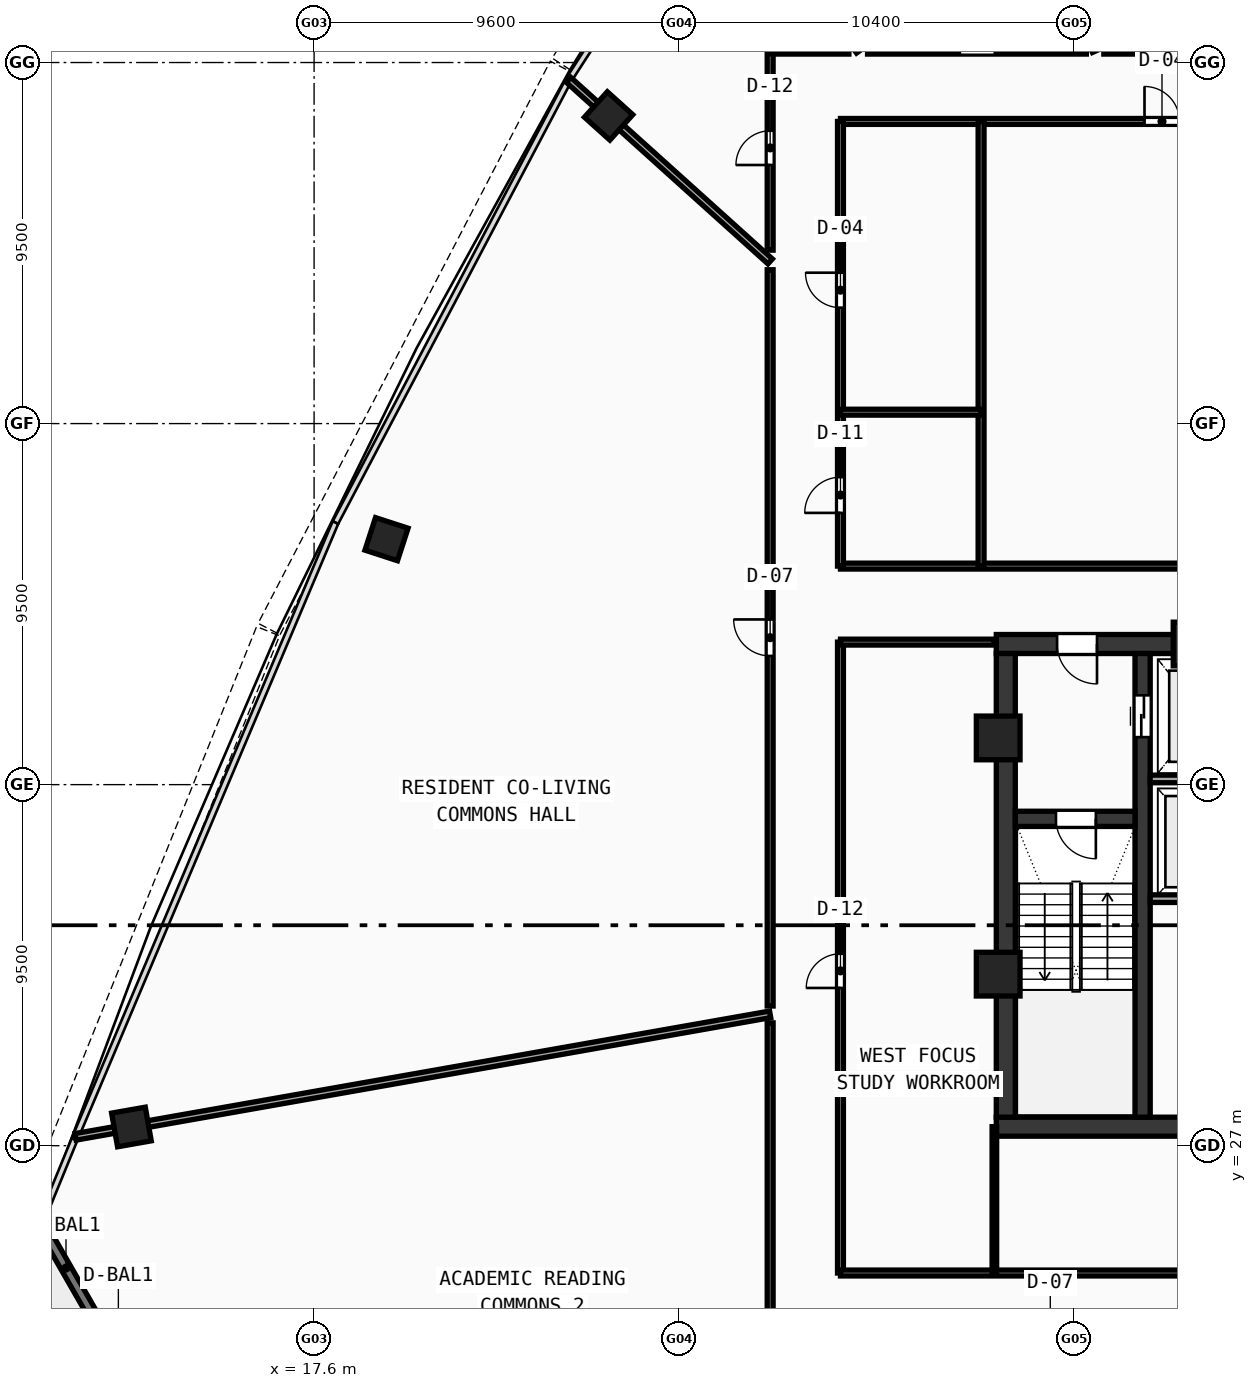
"""IFC4 building model, lengths in metres.
Left out: names, types, materials, properties, quantities, classifications, styles, units other than length and angle.
Written with IfcOpenShell. Run it as: python <this file> out.ifc"""

import sys

from ifc_helpers import new_model, si_unit, direction, frame, frame_2d, origin, origin_with_axes, origin_2d, place, context, subcontext, project, spatial, rectangle, hollow_rectangle, extrude, source, transform, mapped, element, fill, save


model = new_model("IFC4")
c1 = context("Model", 3, precision=1e-05, world=origin(), true_north=direction((0.0, 1.0)))
c2 = subcontext(c1, "Body", "Model", "MODEL_VIEW")
j1 = project(units=[si_unit("LENGTHUNIT", "METRE"), si_unit("PLANEANGLEUNIT", "RADIAN")], contexts=[c1])
p1 = place(None, origin())
s1 = spatial("IfcSite", under=j1, at=p1, CompositionType="ELEMENT")
p2 = place(p1, origin())
s2 = spatial("IfcBuilding", under=s1, at=p2, CompositionType="ELEMENT")
p3 = place(p2, frame((0.0, 0.0, 215.16)))
s3 = spatial("IfcBuildingStorey", under=s2, at=p3, CompositionType="ELEMENT", Elevation=215.16)
p4 = place(p3, frame((35.55, 27.5, 0.0), z_axis=(0.0, 0.0, 1.0), x_axis=(1.0, 0.0, 0.0)))
e1 = element("IfcWall", 1, at=p4, inside=s3, PredefinedType="SHEAR", context=c2, shape_type="SweptSolid", body=[
    extrude(rectangle(XDim=24.9, YDim=0.5, at=frame_2d((12.45, 0.0))), origin(), (0.0, 0.0, 1.0), 3.52),
])
p5 = place(p3, frame((35.55, 40.2, 0.0), z_axis=(0.0, 0.0, 1.0), x_axis=(1.0, 0.0, 0.0)))
e2 = element("IfcWall", 2, at=p5, inside=s3, PredefinedType="SHEAR", context=c2, shape_type="SweptSolid", body=[
    extrude(rectangle(XDim=11.25, YDim=0.5, at=frame_2d((5.625, 0.0))), origin(), (0.0, 0.0, 1.0), 3.52),
])
p6 = place(p5, frame((1.6, 0.0, 0.0)))
e3 = element("IfcOpeningElement", 3, at=p6, cuts=e2, PredefinedType="OPENING", context=c2, shape_type="SweptSolid", body=[
    extrude(rectangle(XDim=1.05, YDim=2.1, at=frame_2d((0.525, 1.05))), frame((0.0, 0.26, 0.0), z_axis=(0.0, -1.0, 0.0), x_axis=(1.0, 0.0, 0.0)), (0.0, 0.0, 1.0), 0.52),
])
p7 = place(p3, frame((35.8, 27.75, 0.0), z_axis=(0.0, 0.0, 1.0), x_axis=(0.0, 1.0, 0.0)))
e4 = element("IfcWall", 4, at=p7, inside=s3, PredefinedType="SHEAR", context=c2, shape_type="SweptSolid", body=[
    extrude(rectangle(XDim=12.2, YDim=0.5, at=frame_2d((6.1, 0.0))), origin(), (0.0, 0.0, 1.0), 3.52),
])
p8 = place(p3, frame((39.4, 27.75, 0.0), z_axis=(0.0, 0.0, 1.0), x_axis=(0.0, 1.0, 0.0)))
e5 = element("IfcWall", 5, at=p8, inside=s3, PredefinedType="SHEAR", context=c2, shape_type="SweptSolid", body=[
    extrude(rectangle(XDim=12.2, YDim=0.4, at=frame_2d((6.1, 0.0))), origin(), (0.0, 0.0, 1.0), 3.52),
])
p9 = place(p8, frame((10.0, 0.0, 0.0)))
e6 = element("IfcOpeningElement", 6, at=p9, cuts=e5, PredefinedType="OPENING", context=c2, shape_type="SweptSolid", body=[
    extrude(rectangle(XDim=1.1, YDim=2.1, at=frame_2d((0.55, 1.05))), frame((0.0, 0.21, 0.0), z_axis=(0.0, -1.0, 0.0), x_axis=(1.0, 0.0, 0.0)), (0.0, 0.0, 1.0), 0.42),
])
p10 = place(p3, frame((36.05, 35.6, 0.0), z_axis=(0.0, 0.0, 1.0), x_axis=(1.0, 0.0, 0.0)))
e7 = element("IfcWall", 7, at=p10, inside=s3, PredefinedType="SHEAR", context=c2, shape_type="SweptSolid", body=[
    extrude(rectangle(XDim=3.15, YDim=0.4, at=frame_2d((1.575, 0.0))), origin(), (0.0, 0.0, 1.0), 3.52),
])
p11 = place(p10, frame((1.07, 0.0, 0.0)))
e8 = element("IfcOpeningElement", 8, at=p11, cuts=e7, PredefinedType="OPENING", context=c2, shape_type="SweptSolid", body=[
    extrude(rectangle(XDim=1.05, YDim=2.1, at=frame_2d((0.525, 1.05))), frame((0.0, 0.21, 0.0), z_axis=(0.0, -1.0, 0.0), x_axis=(1.0, 0.0, 0.0)), (0.0, 0.0, 1.0), 0.42),
])
m1 = source(origin(), c2, "Body", "SweptSolid", [
    extrude(hollow_rectangle(XDim=1.15, YDim=1.15, WallThickness=0.048, at=origin_2d()), origin(), (0.0, 0.0, 1.0), 3.78),
])
for number, where, z_axis, x_axis in (
    (9, (40.781, 40.2, -0.26), (0.0, 0.0, 1.0), (1.0, 0.0, 0.0)),
    (10, (35.6, 37.729, -0.26), (0.0, 0.0, 1.0), (1.0, 0.0, 0.0)),
    (11, (35.6, 31.513, -0.26), (0.0, 0.0, 1.0), (1.0, 0.0, 0.0)),
):
    element("IfcColumn", number, at=place(p3, frame(where, z_axis=z_axis, x_axis=x_axis)), inside=s3, PredefinedType="COLUMN", context=c2, shape_type="MappedRepresentation", body=[
        mapped(m1, transform((0.0, 0.0, 0.0), scale=1.0)),
    ])
m2 = source(origin(), c2, "Body", "SweptSolid", [
    extrude(hollow_rectangle(XDim=0.9, YDim=0.9, WallThickness=0.036, at=origin_2d()), origin(), (0.0, 0.0, 1.0), 3.78),
])
for number, where, z_axis, x_axis in (
    (12, (25.349, 54.095, -0.26), (0.0, 0.0, 1.0), (-0.669, -0.743, 0.0)),
    (13, (19.505, 42.958, -0.26), (0.0, 0.0, 1.0), (-0.309, -0.951, 0.0)),
    (14, (12.793, 27.492, -0.26), (0.0, 0.0, 1.0), (0.174, -0.985, 0.0)),
):
    element("IfcColumn", number, at=place(p3, frame(where, z_axis=z_axis, x_axis=x_axis)), inside=s3, PredefinedType="COLUMN", context=c2, shape_type="MappedRepresentation", body=[
        mapped(m2, transform((0.0, 0.0, 0.0), scale=1.0)),
    ])
p12 = place(p3, frame((10.365, 25.01, 0.0), z_axis=(0.0, 0.0, 1.0), x_axis=(0.497934125263, -0.867214856249, 0.0)))
e15 = element("IfcWall", 15, at=p12, inside=s3, PredefinedType="STANDARD", context=c2, shape_type="SweptSolid", body=[
    extrude(rectangle(XDim=8.373, YDim=0.26, at=frame_2d((4.186, 0.0))), origin(), (0.0, 0.0, 1.0), 3.52),
])
p13 = place(p12, frame((3.286, 0.0, 0.0)))
e16 = element("IfcOpeningElement", 16, at=p13, cuts=e15, PredefinedType="OPENING", context=c2, shape_type="SweptSolid", body=[
    extrude(rectangle(XDim=1.8, YDim=2.15, at=frame_2d((0.9, 1.075))), frame((0.0, 0.14, 0.0), z_axis=(0.0, -1.0, 0.0), x_axis=(1.0, 0.0, 0.0)), (0.0, 0.0, 1.0), 0.28),
])
for number, where, z_axis, x_axis in (
    (17, (39.6, 36.65, 0.0), (0.0, 0.0, 1.0), (1.0, 0.0, 0.0)),
    (18, (39.6, 33.5, 0.0), (0.0, 0.0, 1.0), (1.0, 0.0, 0.0)),
):
    element("IfcWall", number, at=place(p3, frame(where, z_axis=z_axis, x_axis=x_axis)), inside=s3, PredefinedType="SOLIDWALL", context=c2, shape_type="SweptSolid", body=[
        extrude(rectangle(XDim=2.72, YDim=0.2, at=frame_2d((1.36, 0.0))), origin(), (0.0, 0.0, 1.0), 3.52),
    ])
p14 = place(p3, frame((31.45, 42.25, 0.0), z_axis=(0.0, 0.0, 1.0), x_axis=(1.0, 0.0, 0.0)))
e19 = element("IfcWall", 19, at=p14, inside=s3, PredefinedType="PARTITIONING", context=c2, shape_type="SweptSolid", body=[
    extrude(rectangle(XDim=33.1, YDim=0.155, at=frame_2d((16.55, 0.0))), origin(), (0.0, 0.0, 1.0), 2.87),
])
p15 = place(p3, frame((31.45, 53.95, 0.0), z_axis=(0.0, 0.0, 1.0), x_axis=(1.0, 0.0, 0.0)))
e20 = element("IfcWall", 20, at=p15, inside=s3, PredefinedType="PARTITIONING", context=c2, shape_type="SweptSolid", body=[
    extrude(rectangle(XDim=33.1, YDim=0.155, at=frame_2d((16.55, 0.0))), origin(), (0.0, 0.0, 1.0), 2.87),
])
p16 = place(p15, frame((8.0, 0.0, 0.0)))
e21 = element("IfcOpeningElement", 21, at=p16, cuts=e20, PredefinedType="OPENING", context=c2, shape_type="SweptSolid", body=[
    extrude(rectangle(XDim=0.92, YDim=2.1, at=frame_2d((0.46, 1.05))), frame((0.0, 0.087, 0.0), z_axis=(0.0, -1.0, 0.0), x_axis=(1.0, 0.0, 0.0)), (0.0, 0.0, 1.0), 0.175),
])
p17 = place(p15, frame((27.05, 0.0, 0.0)))
e22 = element("IfcOpeningElement", 22, at=p17, cuts=e20, PredefinedType="OPENING", context=c2, shape_type="SweptSolid", body=[
    extrude(rectangle(XDim=0.92, YDim=2.1, at=frame_2d((0.46, 1.05))), frame((0.0, 0.087, 0.0), z_axis=(0.0, -1.0, 0.0), x_axis=(1.0, 0.0, 0.0)), (0.0, 0.0, 1.0), 0.175),
])
p18 = place(p3, frame((31.45, 42.25, 0.0), z_axis=(0.0, 0.0, 1.0), x_axis=(0.0, 1.0, 0.0)))
e23 = element("IfcWall", 23, at=p18, inside=s3, PredefinedType="PARTITIONING", context=c2, shape_type="SweptSolid", body=[
    extrude(rectangle(XDim=11.7, YDim=0.155, at=frame_2d((5.85, 0.0))), origin(), (0.0, 0.0, 1.0), 2.87),
])
p19 = place(p18, frame((1.4, 0.0, 0.0)))
e24 = element("IfcOpeningElement", 24, at=p19, cuts=e23, PredefinedType="OPENING", context=c2, shape_type="SweptSolid", body=[
    extrude(rectangle(XDim=0.94, YDim=2.1, at=frame_2d((0.47, 1.05))), frame((0.0, 0.087, 0.0), z_axis=(0.0, -1.0, 0.0), x_axis=(1.0, 0.0, 0.0)), (0.0, 0.0, 1.0), 0.175),
])
p20 = place(p18, frame((6.8, 0.0, 0.0)))
e25 = element("IfcOpeningElement", 25, at=p20, cuts=e23, PredefinedType="OPENING", context=c2, shape_type="SweptSolid", body=[
    extrude(rectangle(XDim=0.92, YDim=2.1, at=frame_2d((0.46, 1.05))), frame((0.0, 0.087, 0.0), z_axis=(0.0, -1.0, 0.0), x_axis=(1.0, 0.0, 0.0)), (0.0, 0.0, 1.0), 0.175),
])
p21 = place(p3, frame((35.15, 42.25, 0.0), z_axis=(0.0, 0.0, 1.0), x_axis=(0.0, 1.0, 0.0)))
e26 = element("IfcWall", 26, at=p21, inside=s3, PredefinedType="PARTITIONING", context=c2, shape_type="SweptSolid", body=[
    extrude(rectangle(XDim=11.7, YDim=0.155, at=frame_2d((5.85, 0.0))), origin(), (0.0, 0.0, 1.0), 2.87),
])
p22 = place(p3, frame((31.45, 46.3, 0.0), z_axis=(0.0, 0.0, 1.0), x_axis=(1.0, 0.0, 0.0)))
e27 = element("IfcWall", 27, at=p22, inside=s3, PredefinedType="PARTITIONING", context=c2, shape_type="SweptSolid", body=[
    extrude(rectangle(XDim=3.7, YDim=0.155, at=frame_2d((1.85, 0.0))), origin(), (0.0, 0.0, 1.0), 2.87),
])
p23 = place(p3, frame((31.45, 23.65, 0.0), z_axis=(0.0, 0.0, 1.0), x_axis=(0.0, 1.0, 0.0)))
e28 = element("IfcWall", 28, at=p23, inside=s3, PredefinedType="PARTITIONING", context=c2, shape_type="SweptSolid", body=[
    extrude(rectangle(XDim=16.6, YDim=0.155, at=frame_2d((8.3, 0.0))), origin(), (0.0, 0.0, 1.0), 2.87),
])
p24 = place(p23, frame((7.5, 0.0, 0.0)))
e29 = element("IfcOpeningElement", 29, at=p24, cuts=e28, PredefinedType="OPENING", context=c2, shape_type="SweptSolid", body=[
    extrude(rectangle(XDim=0.9, YDim=2.08, at=frame_2d((0.45, 1.04))), frame((0.0, 0.087, 0.0), z_axis=(0.0, -1.0, 0.0), x_axis=(1.0, 0.0, 0.0)), (0.0, 0.0, 1.0), 0.175),
])
p25 = place(p3, frame((31.45, 23.65, 0.0), z_axis=(0.0, 0.0, 1.0), x_axis=(1.0, 0.0, 0.0)))
e30 = element("IfcWall", 30, at=p25, inside=s3, PredefinedType="PARTITIONING", context=c2, shape_type="SweptSolid", body=[
    extrude(rectangle(XDim=33.1, YDim=0.155, at=frame_2d((16.55, 0.0))), origin(), (0.0, 0.0, 1.0), 2.87),
])
p26 = place(p25, frame((16.0, 0.0, 0.0)))
e31 = element("IfcOpeningElement", 31, at=p26, cuts=e30, PredefinedType="OPENING", context=c2, shape_type="SweptSolid", body=[
    extrude(rectangle(XDim=0.92, YDim=2.1, at=frame_2d((0.46, 1.05))), frame((0.0, 0.087, 0.0), z_axis=(0.0, -1.0, 0.0), x_axis=(1.0, 0.0, 0.0)), (0.0, 0.0, 1.0), 0.175),
])
p27 = place(p3, frame((31.45, 40.25, 0.0), z_axis=(0.0, 0.0, 1.0), x_axis=(1.0, 0.0, 0.0)))
e32 = element("IfcWall", 32, at=p27, inside=s3, PredefinedType="PARTITIONING", context=c2, shape_type="SweptSolid", body=[
    extrude(rectangle(XDim=4.05, YDim=0.155, at=frame_2d((2.025, 0.0))), origin(), (0.0, 0.0, 1.0), 3.52),
])
p28 = place(p3, frame((35.5, 23.65, 0.0), z_axis=(0.0, 0.0, 1.0), x_axis=(0.0, 1.0, 0.0)))
e33 = element("IfcWall", 33, at=p28, inside=s3, PredefinedType="PARTITIONING", context=c2, shape_type="SweptSolid", body=[
    extrude(rectangle(XDim=3.85, YDim=0.12, at=frame_2d((1.925, 0.0))), origin(), (0.0, 0.0, 1.0), 3.12),
])
p29 = place(p3, frame((38.16, 55.8, 0.0), z_axis=(0.0, 0.0, 1.0), x_axis=(-0.406732574237, 0.913547269196, 0.0)))
e34 = element("IfcWall", 34, at=p29, inside=s3, PredefinedType="PARTITIONING", context=c2, shape_type="SweptSolid", body=[
    extrude(rectangle(XDim=13.419, YDim=0.175, at=frame_2d((6.709, 0.0))), origin(), (0.0, 0.0, 1.0), 2.87),
])
p30 = place(p3, frame((31.943, 55.8, 0.0), z_axis=(0.0, 0.0, 1.0), x_axis=(-0.587786531485, 0.809016064986, 0.0)))
e35 = element("IfcWall", 35, at=p30, inside=s3, PredefinedType="PARTITIONING", context=c2, shape_type="SweptSolid", body=[
    extrude(rectangle(XDim=6.446, YDim=0.175, at=frame_2d((3.223, 0.0))), origin(), (0.0, 0.0, 1.0), 2.87),
])
p31 = place(p3, frame((29.6, 50.267, 0.0), z_axis=(0.0, 0.0, 1.0), x_axis=(-0.743146095384, 0.669129195982, 0.0)))
e36 = element("IfcWall", 36, at=p31, inside=s3, PredefinedType="PARTITIONING", context=c2, shape_type="SweptSolid", body=[
    extrude(rectangle(XDim=7.135, YDim=0.175, at=frame_2d((3.567, 0.0))), origin(), (0.0, 0.0, 1.0), 2.87),
])
p32 = place(p3, frame((29.6, 30.456, 0.0), z_axis=(0.0, 0.0, 1.0), x_axis=(-0.984808051039, -0.173646487465, 0.0)))
e37 = element("IfcWall", 37, at=p32, inside=s3, PredefinedType="PARTITIONING", context=c2, shape_type="SweptSolid", body=[
    extrude(rectangle(XDim=18.557, YDim=0.175, at=frame_2d((9.279, 0.0))), origin(), (0.0, 0.0, 1.0), 2.87),
])
p33 = place(p3, frame((29.6, 21.8, 0.0), z_axis=(0.0, 0.0, 1.0), x_axis=(0.0, 1.0, 0.0)))
e38 = element("IfcWall", 38, at=p33, inside=s3, PredefinedType="PARTITIONING", context=c2, shape_type="SweptSolid", body=[
    extrude(rectangle(XDim=8.432, YDim=0.155, at=frame_2d((4.216, 0.0))), origin(), (0.0, 0.0, 1.0), 3.12),
])
p34 = place(p3, frame((29.6, 30.675, 0.0), z_axis=(0.0, 0.0, 1.0), x_axis=(0.0, 1.0, 0.0)))
e39 = element("IfcWall", 39, at=p34, inside=s3, PredefinedType="PARTITIONING", context=c2, shape_type="SweptSolid", body=[
    extrude(rectangle(XDim=19.372, YDim=0.155, at=frame_2d((9.686, 0.0))), origin(), (0.0, 0.0, 1.0), 2.87),
])
p35 = place(p34, frame((9.211, 0.0, 0.0)))
e40 = element("IfcOpeningElement", 40, at=p35, cuts=e39, PredefinedType="OPENING", context=c2, shape_type="SweptSolid", body=[
    extrude(rectangle(XDim=0.96, YDim=2.12, at=frame_2d((0.48, 1.06))), frame((0.0, 0.087, 0.0), z_axis=(0.0, -1.0, 0.0), x_axis=(1.0, 0.0, 0.0)), (0.0, 0.0, 1.0), 0.175),
])
p36 = place(p3, frame((29.6, 50.563, 0.0), z_axis=(0.0, 0.0, 1.0), x_axis=(0.0, 1.0, 0.0)))
e41 = element("IfcWall", 41, at=p36, inside=s3, PredefinedType="PARTITIONING", context=c2, shape_type="SweptSolid", body=[
    extrude(rectangle(XDim=5.237, YDim=0.155, at=frame_2d((2.618, 0.0))), origin(), (0.0, 0.0, 1.0), 3.52),
])
p37 = place(p36, frame((2.24, 0.0, 0.0)))
e42 = element("IfcOpeningElement", 42, at=p37, cuts=e41, PredefinedType="OPENING", context=c2, shape_type="SweptSolid", body=[
    extrude(rectangle(XDim=0.9, YDim=2.08, at=frame_2d((0.45, 1.04))), frame((0.0, 0.087, 0.0), z_axis=(0.0, -1.0, 0.0), x_axis=(1.0, 0.0, 0.0)), (0.0, 0.0, 1.0), 0.175),
])
p38 = place(p3, frame((29.6, 55.8, 0.0), z_axis=(0.0, 0.0, 1.0), x_axis=(1.0, 0.0, 0.0)))
e43 = element("IfcWall", 43, at=p38, inside=s3, PredefinedType="PARTITIONING", context=c2, shape_type="SweptSolid", body=[
    extrude(rectangle(XDim=2.071, YDim=0.155, at=frame_2d((1.036, 0.0))), origin(), (0.0, 0.0, 1.0), 3.52),
])
p39 = place(p3, frame((32.163, 55.8, 0.0), z_axis=(0.0, 0.0, 1.0), x_axis=(1.0, 0.0, 0.0)))
e44 = element("IfcWall", 44, at=p39, inside=s3, PredefinedType="PARTITIONING", context=c2, shape_type="SweptSolid", body=[
    extrude(rectangle(XDim=5.757, YDim=0.155, at=frame_2d((2.878, 0.0))), origin(), (0.0, 0.0, 1.0), 3.12),
])
p40 = place(p39, frame((2.429, 0.0, 0.0)))
e45 = element("IfcOpeningElement", 45, at=p40, cuts=e44, PredefinedType="OPENING", context=c2, shape_type="SweptSolid", body=[
    extrude(rectangle(XDim=0.92, YDim=2.1, at=frame_2d((0.46, 1.05))), frame((0.0, 0.087, 0.0), z_axis=(0.0, -1.0, 0.0), x_axis=(1.0, 0.0, 0.0)), (0.0, 0.0, 1.0), 0.175),
])
p41 = place(p3, frame((38.38, 55.8, 0.0), z_axis=(0.0, 0.0, 1.0), x_axis=(1.0, 0.0, 0.0)))
e46 = element("IfcWall", 46, at=p41, inside=s3, PredefinedType="PARTITIONING", context=c2, shape_type="SweptSolid", body=[
    extrude(rectangle(XDim=5.329, YDim=0.155, at=frame_2d((2.665, 0.0))), origin(), (0.0, 0.0, 1.0), 2.87),
])
p42 = place(p41, frame((2.13, 0.0, 0.0)))
e47 = element("IfcOpeningElement", 47, at=p42, cuts=e46, PredefinedType="OPENING", context=c2, shape_type="SweptSolid", body=[
    extrude(rectangle(XDim=0.92, YDim=2.1, at=frame_2d((0.46, 1.05))), frame((0.0, 0.087, 0.0), z_axis=(0.0, -1.0, 0.0), x_axis=(1.0, 0.0, 0.0)), (0.0, 0.0, 1.0), 0.175),
])
m3 = source(origin(), c2, "Body", "SweptSolid", [
    extrude(rectangle(XDim=1.05, YDim=2.1, at=frame_2d((0.525, 1.05))), frame((0.0, 0.025, 0.0), z_axis=(0.0, -1.0, 0.0), x_axis=(1.0, 0.0, 0.0)), (0.0, 0.0, 1.0), 0.05),
])
p43 = place(p11, frame((1.05, 0.0, 0.0), z_axis=(0.0, 0.0, 1.0), x_axis=(-1.0, 0.0, 0.0)))
e48 = element("IfcDoor", 48, at=p43, inside=s3, OperationType="SINGLE_SWING_LEFT", PredefinedType="DOOR", context=c2, shape_type="MappedRepresentation", body=[
    mapped(m3, transform((0.0, 0.0, 0.0), scale=1.0)),
])
fill(e8, e48)
p44 = place(p6, frame((1.05, 0.0, 0.0), z_axis=(0.0, 0.0, 1.0), x_axis=(-1.0, 0.0, 0.0)))
e49 = element("IfcDoor", 49, at=p44, inside=s3, OperationType="SINGLE_SWING_LEFT", PredefinedType="DOOR", context=c2, shape_type="MappedRepresentation", body=[
    mapped(m3, transform((0.0, 0.0, 0.0), scale=1.0)),
])
fill(e3, e49)
m4 = source(origin(), c2, "Body", "SweptSolid", [
    extrude(rectangle(XDim=1.1, YDim=2.1, at=frame_2d((0.55, 1.05))), frame((0.0, 0.025, 0.0), z_axis=(0.0, -1.0, 0.0), x_axis=(1.0, 0.0, 0.0)), (0.0, 0.0, 1.0), 0.05),
])
p45 = place(p9, frame((1.1, 0.0, 0.0), z_axis=(0.0, 0.0, 1.0), x_axis=(-1.0, 0.0, 0.0)))
e50 = element("IfcDoor", 50, at=p45, inside=s3, OperationType="DOUBLE_DOOR_SLIDING", PredefinedType="DOOR", context=c2, shape_type="MappedRepresentation", body=[
    mapped(m4, transform((0.0, 0.0, 0.0), scale=1.0)),
])
fill(e6, e50)
m5 = source(origin(), c2, "Body", "SweptSolid", [
    extrude(rectangle(XDim=0.94, YDim=2.1, at=frame_2d((0.47, 1.05))), frame((0.0, 0.025, 0.0), z_axis=(0.0, -1.0, 0.0), x_axis=(1.0, 0.0, 0.0)), (0.0, 0.0, 1.0), 0.05),
])
p46 = place(p19, origin_with_axes())
e51 = element("IfcDoor", 51, at=p46, inside=s3, OperationType="SINGLE_SWING_LEFT", PredefinedType="DOOR", context=c2, shape_type="MappedRepresentation", body=[
    mapped(m5, transform((0.0, 0.0, 0.0), scale=1.0)),
])
fill(e24, e51)
m6 = source(origin(), c2, "Body", "SweptSolid", [
    extrude(rectangle(XDim=0.92, YDim=2.1, at=frame_2d((0.46, 1.05))), frame((0.0, 0.025, 0.0), z_axis=(0.0, -1.0, 0.0), x_axis=(1.0, 0.0, 0.0)), (0.0, 0.0, 1.0), 0.05),
])
p47 = place(p20, origin_with_axes())
e52 = element("IfcDoor", 52, at=p47, inside=s3, OperationType="SINGLE_SWING_RIGHT", PredefinedType="DOOR", context=c2, shape_type="MappedRepresentation", body=[
    mapped(m6, transform((0.0, 0.0, 0.0), scale=1.0)),
])
fill(e25, e52)
p48 = place(p16, origin_with_axes())
e53 = element("IfcDoor", 53, at=p48, inside=s3, OperationType="SINGLE_SWING_LEFT", PredefinedType="DOOR", context=c2, shape_type="MappedRepresentation", body=[
    mapped(m6, transform((0.0, 0.0, 0.0), scale=1.0)),
])
fill(e21, e53)
m7 = source(origin(), c2, "Body", "SweptSolid", [
    extrude(rectangle(XDim=0.9, YDim=2.08, at=frame_2d((0.45, 1.04))), frame((0.0, 0.025, 0.0), z_axis=(0.0, -1.0, 0.0), x_axis=(1.0, 0.0, 0.0)), (0.0, 0.0, 1.0), 0.05),
])
p49 = place(p24, origin_with_axes())
e54 = element("IfcDoor", 54, at=p49, inside=s3, OperationType="SINGLE_SWING_LEFT", PredefinedType="DOOR", context=c2, shape_type="MappedRepresentation", body=[
    mapped(m7, transform((0.0, 0.0, 0.0), scale=1.0)),
])
fill(e29, e54)
p50 = place(p40, origin_with_axes())
e55 = element("IfcDoor", 55, at=p50, inside=s3, OperationType="SINGLE_SWING_RIGHT", PredefinedType="DOOR", context=c2, shape_type="MappedRepresentation", body=[
    mapped(m6, transform((0.0, 0.0, 0.0), scale=1.0)),
])
fill(e45, e55)
p51 = place(p37, origin_with_axes())
e56 = element("IfcDoor", 56, at=p51, inside=s3, OperationType="SINGLE_SWING_LEFT", PredefinedType="DOOR", context=c2, shape_type="MappedRepresentation", body=[
    mapped(m7, transform((0.0, 0.0, 0.0), scale=1.0)),
])
fill(e42, e56)
m8 = source(origin(), c2, "Body", "SweptSolid", [
    extrude(rectangle(XDim=0.96, YDim=2.12, at=frame_2d((0.48, 1.06))), frame((0.0, 0.025, 0.0), z_axis=(0.0, -1.0, 0.0), x_axis=(1.0, 0.0, 0.0)), (0.0, 0.0, 1.0), 0.05),
])
p52 = place(p35, origin_with_axes())
e57 = element("IfcDoor", 57, at=p52, inside=s3, OperationType="SINGLE_SWING_RIGHT", PredefinedType="DOOR", context=c2, shape_type="MappedRepresentation", body=[
    mapped(m8, transform((0.0, 0.0, 0.0), scale=1.0)),
])
fill(e40, e57)
save(model, sys.argv[1])
